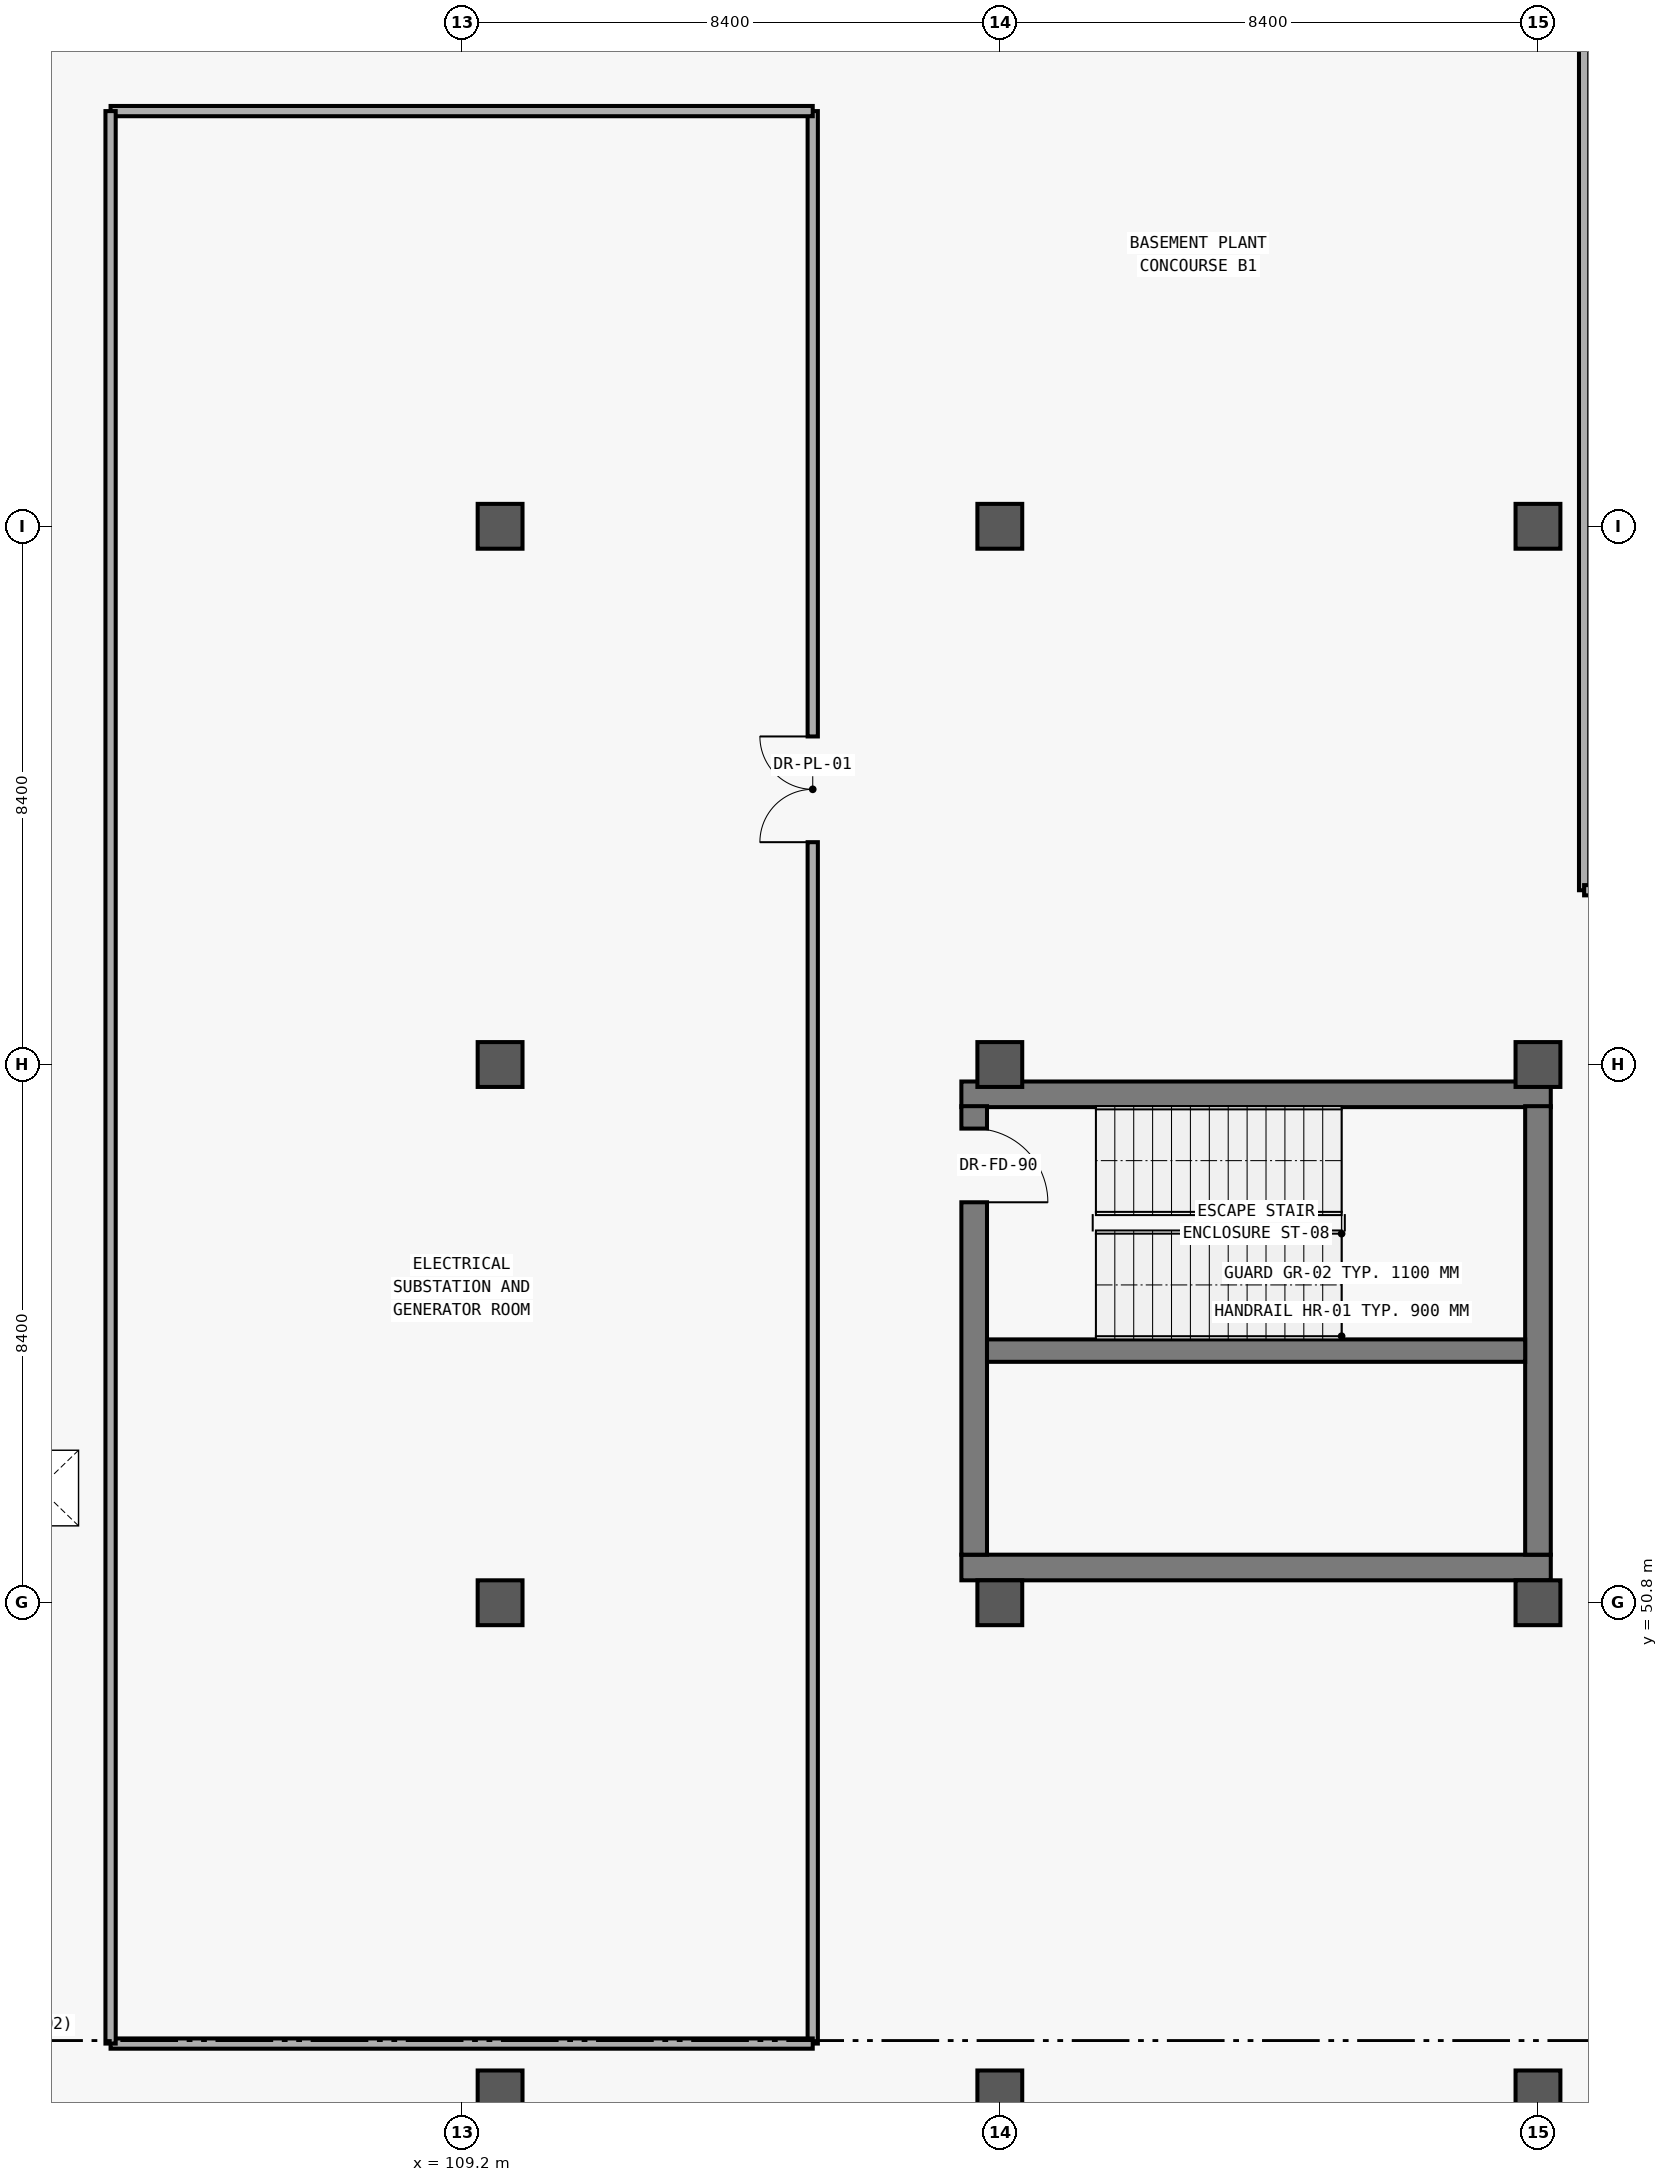
"""IFC4 building model, lengths in metres.
Left out: names, types, materials, properties, quantities, classifications, styles, units other than length and angle.
Written with IfcOpenShell. Run it as: python <this file> out.ifc"""

import sys

from ifc_helpers import new_model, si_unit, direction, frame, frame_2d, origin, origin_2d, place, context, subcontext, project, spatial, rectangle, extrude, element, fill, save


model = new_model("IFC4")
c1 = context("Model", 3, precision=1e-05, world=origin(), true_north=direction((0.0, 1.0)))
c2 = subcontext(c1, "Body", "Model", "MODEL_VIEW")
j1 = project(units=[si_unit("LENGTHUNIT", "METRE"), si_unit("PLANEANGLEUNIT", "RADIAN")], contexts=[c1])
p1 = place(None, origin())
s1 = spatial("IfcSite", under=j1, at=p1, CompositionType="ELEMENT")
p2 = place(p1, origin())
s2 = spatial("IfcBuilding", under=s1, at=p2, CompositionType="ELEMENT")
p3 = place(p2, frame((0.0, 0.0, -4.8)))
s3 = spatial("IfcBuildingStorey", under=s2, at=p3, CompositionType="ELEMENT", Elevation=-4.8)
for number, where, z_axis, x_axis in (
    (1, (109.8, 43.15, 0.0), (0.0, 0.0, 1.0), (1.0, 0.0, 0.0)),
    (2, (109.8, 50.8, 0.0), (0.0, 0.0, 1.0), (1.0, 0.0, 0.0)),
    (3, (109.8, 59.2, 0.0), (0.0, 0.0, 1.0), (1.0, 0.0, 0.0)),
    (4, (109.8, 67.6, 0.0), (0.0, 0.0, 1.0), (1.0, 0.0, 0.0)),
    (5, (117.6, 43.15, 0.0), (0.0, 0.0, 1.0), (1.0, 0.0, 0.0)),
    (6, (117.6, 50.8, 0.0), (0.0, 0.0, 1.0), (1.0, 0.0, 0.0)),
    (7, (117.6, 59.2, 0.0), (0.0, 0.0, 1.0), (1.0, 0.0, 0.0)),
    (8, (117.6, 67.6, 0.0), (0.0, 0.0, 1.0), (1.0, 0.0, 0.0)),
    (9, (126.0, 43.15, 0.0), (0.0, 0.0, 1.0), (1.0, 0.0, 0.0)),
    (10, (126.0, 50.8, 0.0), (0.0, 0.0, 1.0), (1.0, 0.0, 0.0)),
    (11, (126.0, 59.2, 0.0), (0.0, 0.0, 1.0), (1.0, 0.0, 0.0)),
    (12, (126.0, 67.6, 0.0), (0.0, 0.0, 1.0), (1.0, 0.0, 0.0)),
):
    element("IfcColumn", number, at=place(p3, frame(where, z_axis=z_axis, x_axis=x_axis)), inside=s3, PredefinedType="COLUMN", context=c2, shape_type="SweptSolid", body=[
        extrude(rectangle(XDim=0.7, YDim=0.7, at=origin_2d()), origin(), (0.0, 0.0, 1.0), 4.8),
    ])
for number, where, z_axis, x_axis in (
    (13, (117.0, 51.35, 0.0), (0.0, 0.0, 1.0), (1.0, 0.0, 0.0)),
    (14, (126.2, 58.735, 0.0), (0.0, 0.0, 1.0), (-1.0, 0.0, 0.0)),
):
    element("IfcWall", number, at=place(p3, frame(where, z_axis=z_axis, x_axis=x_axis)), inside=s3, PredefinedType="SHEAR", context=c2, shape_type="SweptSolid", body=[
        extrude(rectangle(XDim=9.2, YDim=0.4, at=frame_2d((4.6, 0.0))), origin(), (0.0, 0.0, 1.0), 4.48),
    ])
p4 = place(p3, frame((117.2, 58.55, 0.0), z_axis=(0.0, 0.0, 1.0), x_axis=(0.0, -1.0, 0.0)))
e15 = element("IfcWall", 15, at=p4, inside=s3, PredefinedType="SHEAR", context=c2, shape_type="SweptSolid", body=[
    extrude(rectangle(XDim=7.0, YDim=0.4, at=frame_2d((3.5, 0.0))), origin(), (0.0, 0.0, 1.0), 4.48),
])
p5 = place(p4, frame((0.35, 0.0, 0.0)))
e16 = element("IfcOpeningElement", 16, at=p5, cuts=e15, PredefinedType="OPENING", context=c2, shape_type="SweptSolid", body=[
    extrude(rectangle(XDim=1.15, YDim=2.2, at=frame_2d((0.575, 1.1))), frame((0.0, 0.21, 0.0), z_axis=(0.0, -1.0, 0.0), x_axis=(1.0, 0.0, 0.0)), (0.0, 0.0, 1.0), 0.42),
])
p6 = place(p3, frame((126.0, 51.55, 0.0), z_axis=(0.0, 0.0, 1.0), x_axis=(0.0, 1.0, 0.0)))
e17 = element("IfcWall", 17, at=p6, inside=s3, PredefinedType="SHEAR", context=c2, shape_type="SweptSolid", body=[
    extrude(rectangle(XDim=7.0, YDim=0.4, at=frame_2d((3.5, 0.0))), origin(), (0.0, 0.0, 1.0), 4.48),
])
p7 = place(p3, frame((117.4, 54.735, 0.0), z_axis=(0.0, 0.0, 1.0), x_axis=(1.0, 0.0, 0.0)))
e18 = element("IfcWall", 18, at=p7, inside=s3, PredefinedType="SHEAR", context=c2, shape_type="SweptSolid", body=[
    extrude(rectangle(XDim=8.4, YDim=0.35, at=frame_2d((4.2, 0.0))), origin(), (0.0, 0.0, 1.0), 4.48),
])
p8 = place(p3, frame((114.68, 43.92, 0.0), z_axis=(0.0, 0.0, 1.0), x_axis=(0.0, 1.0, 0.0)))
e19 = element("IfcWall", 19, at=p8, inside=s3, PredefinedType="PARTITIONING", context=c2, shape_type="SweptSolid", body=[
    extrude(rectangle(XDim=30.16, YDim=0.16, at=frame_2d((15.08, 0.0))), origin(), (0.0, 0.0, 1.0), 3.58),
])
p9 = place(p8, frame((18.75, 0.0, 0.0)))
e20 = element("IfcOpeningElement", 20, at=p9, cuts=e19, PredefinedType="OPENING", context=c2, shape_type="SweptSolid", body=[
    extrude(rectangle(XDim=1.65, YDim=2.35, at=frame_2d((0.825, 1.175))), frame((0.0, 0.09, 0.0), z_axis=(0.0, -1.0, 0.0), x_axis=(1.0, 0.0, 0.0)), (0.0, 0.0, 1.0), 0.18),
])
p10 = place(p3, frame((126.72, 61.92, 0.0), z_axis=(0.0, 0.0, 1.0), x_axis=(0.0, 1.0, 0.0)))
e21 = element("IfcWall", 21, at=p10, inside=s3, PredefinedType="PARTITIONING", context=c2, shape_type="SweptSolid", body=[
    extrude(rectangle(XDim=21.76, YDim=0.16, at=frame_2d((10.88, 0.0))), origin(), (0.0, 0.0, 1.0), 3.58),
])
p11 = place(p10, frame((17.43, 0.0, 0.0)))
e22 = element("IfcOpeningElement", 22, at=p11, cuts=e21, PredefinedType="OPENING", context=c2, shape_type="SweptSolid", body=[
    extrude(rectangle(XDim=1.65, YDim=2.35, at=frame_2d((0.825, 1.175))), frame((0.0, 0.09, 0.0), z_axis=(0.0, -1.0, 0.0), x_axis=(1.0, 0.0, 0.0)), (0.0, 0.0, 1.0), 0.18),
])
for number, where, z_axis, x_axis in (
    (23, (103.72, 43.92, 0.0), (0.0, 0.0, 1.0), (1.0, 0.0, 0.0)),
    (24, (103.72, 74.08, 0.0), (0.0, 0.0, 1.0), (1.0, 0.0, 0.0)),
):
    element("IfcWall", number, at=place(p3, frame(where, z_axis=z_axis, x_axis=x_axis)), inside=s3, PredefinedType="PARTITIONING", context=c2, shape_type="SweptSolid", body=[
        extrude(rectangle(XDim=10.96, YDim=0.16, at=frame_2d((5.48, 0.0))), origin(), (0.0, 0.0, 1.0), 3.58),
    ])
p12 = place(p3, frame((103.72, 43.92, 0.0), z_axis=(0.0, 0.0, 1.0), x_axis=(0.0, 1.0, 0.0)))
e25 = element("IfcWall", 25, at=p12, inside=s3, PredefinedType="PARTITIONING", context=c2, shape_type="SweptSolid", body=[
    extrude(rectangle(XDim=30.16, YDim=0.16, at=frame_2d((15.08, 0.0))), origin(), (0.0, 0.0, 1.0), 3.58),
])
p13 = place(p3, frame((126.72, 61.92, 0.0), z_axis=(0.0, 0.0, 1.0), x_axis=(1.0, 0.0, 0.0)))
e26 = element("IfcWall", 26, at=p13, inside=s3, PredefinedType="PARTITIONING", context=c2, shape_type="SweptSolid", body=[
    extrude(rectangle(XDim=15.48, YDim=0.16, at=frame_2d((7.74, 0.0))), origin(), (0.0, 0.0, 1.0), 3.58),
])
p14 = place(p5, origin())
e27 = element("IfcDoor", 27, at=p14, inside=s3, OperationType="SINGLE_SWING_RIGHT", PredefinedType="DOOR", context=c2, shape_type="SweptSolid", body=[
    extrude(rectangle(XDim=1.15, YDim=2.2, at=frame_2d((0.575, 1.1))), frame((0.0, 0.025, 0.0), z_axis=(0.0, -1.0, 0.0), x_axis=(1.0, 0.0, 0.0)), (0.0, 0.0, 1.0), 0.05),
])
fill(e16, e27)
p15 = place(p9, origin())
e28 = element("IfcDoor", 28, at=p15, inside=s3, OperationType="DOUBLE_DOOR_SINGLE_SWING", PredefinedType="DOOR", context=c2, shape_type="SweptSolid", body=[
    extrude(rectangle(XDim=1.65, YDim=2.35, at=frame_2d((0.825, 1.175))), frame((0.0, 0.025, 0.0), z_axis=(0.0, -1.0, 0.0), x_axis=(1.0, 0.0, 0.0)), (0.0, 0.0, 1.0), 0.05),
])
fill(e20, e28)
save(model, sys.argv[1])
